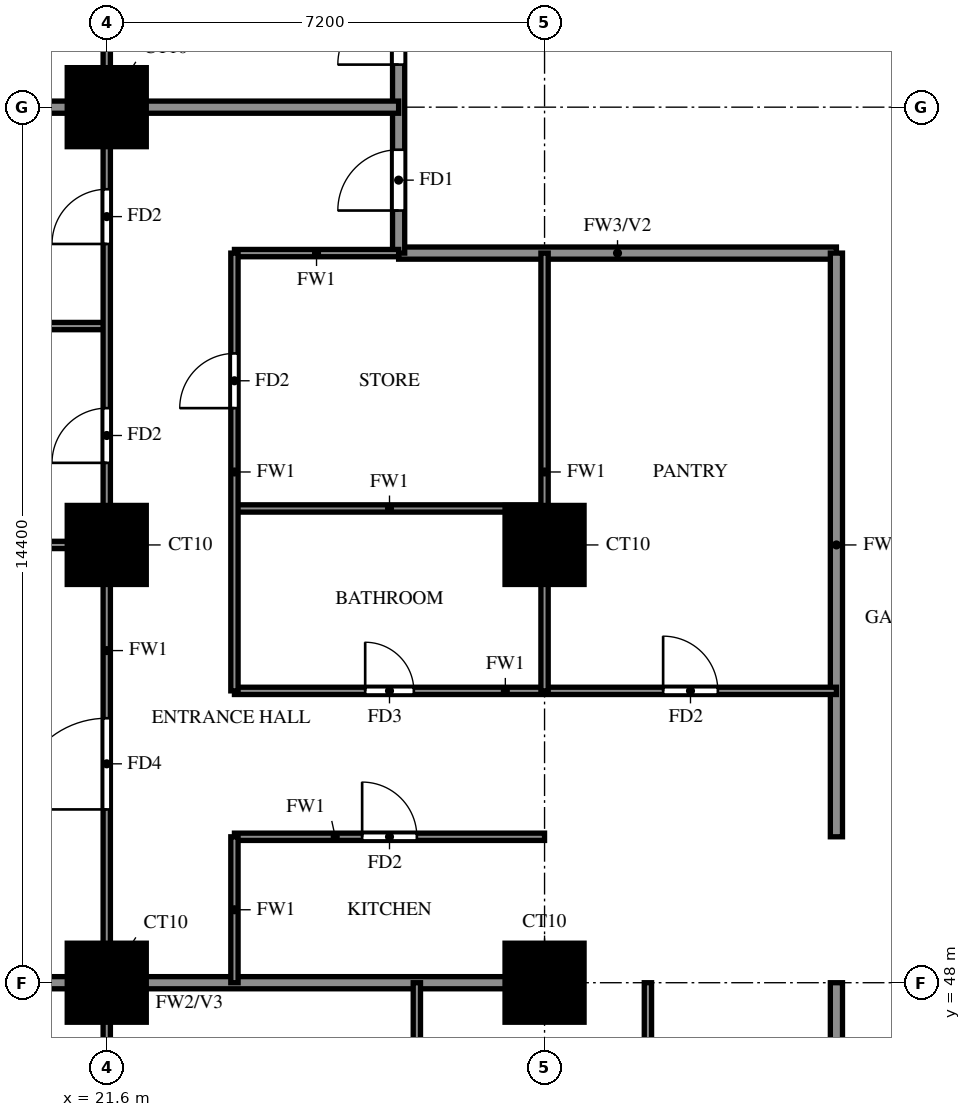
"""IFC4 building model, lengths in metres.
Left out: names, types, materials, properties, quantities, classifications, styles, units other than length and angle.
Written with IfcOpenShell. Run it as: python <this file> out.ifc"""

import sys

from ifc_helpers import new_model, si_unit, direction, frame, frame_2d, origin, origin_2d, place, context, subcontext, project, spatial, rectangle, extrude, source, transform, mapped, element, fill, save


model = new_model("IFC4")
c1 = context("Model", 3, precision=1e-05, world=origin(), true_north=direction((0.0, 1.0)))
c2 = subcontext(c1, "Body", "Model", "MODEL_VIEW")
j1 = project(units=[si_unit("LENGTHUNIT", "METRE"), si_unit("PLANEANGLEUNIT", "RADIAN")], contexts=[c1])
p1 = place(None, origin())
s1 = spatial("IfcSite", under=j1, at=p1, CompositionType="ELEMENT")
p2 = place(p1, origin())
s2 = spatial("IfcBuilding", under=s1, at=p2, CompositionType="ELEMENT")
p3 = place(p2, frame((0.0, 0.0, 76.0)))
s3 = spatial("IfcBuildingStorey", under=s2, at=p3, CompositionType="ELEMENT", Elevation=76.0)
m1 = source(origin(), c2, "Body", "SweptSolid", [
    extrude(rectangle(XDim=1.3, YDim=1.3, at=origin_2d()), origin(), (0.0, 0.0, 1.0), 3.18),
])
for number, where, z_axis, x_axis in (
    (1, (21.6, 48.0, 0.0), (0.0, 0.0, 1.0), (1.0, 0.0, 0.0)),
    (2, (28.8, 48.0, 0.0), (0.0, 0.0, 1.0), (1.0, 0.0, 0.0)),
    (3, (21.6, 55.2, 0.0), (0.0, 0.0, 1.0), (1.0, 0.0, 0.0)),
    (4, (28.8, 55.2, 0.0), (0.0, 0.0, 1.0), (1.0, 0.0, 0.0)),
    (5, (21.6, 62.4, 0.0), (0.0, 0.0, 1.0), (1.0, 0.0, 0.0)),
):
    element("IfcColumn", number, at=place(p3, frame(where, z_axis=z_axis, x_axis=x_axis)), inside=s3, PredefinedType="COLUMN", context=c2, shape_type="MappedRepresentation", body=[
        mapped(m1, transform((0.0, 0.0, 0.0))),
    ])
p4 = place(p3, frame((26.4, 60.0, 0.0), z_axis=(0.0, 0.0, 1.0), x_axis=(1.0, 0.0, 0.0)))
e6 = element("IfcWall", 6, at=p4, inside=s3, PredefinedType="SOLIDWALL", context=c2, shape_type="SweptSolid", body=[
    extrude(rectangle(XDim=7.2, YDim=0.2, at=frame_2d((3.6, 0.0))), origin(), (0.0, 0.0, 1.0), 3.18),
])
p5 = place(p3, frame((26.4, 60.0, 0.0), z_axis=(0.0, 0.0, 1.0), x_axis=(0.0, 1.0, 0.0)))
e7 = element("IfcWall", 7, at=p5, inside=s3, PredefinedType="SOLIDWALL", context=c2, shape_type="SweptSolid", body=[
    extrude(rectangle(XDim=9.45, YDim=0.2, at=frame_2d((4.725, 0.0))), origin(), (0.0, 0.0, 1.0), 3.18),
])
p6 = place(p5, frame((0.7, 0.0, 0.0)))
e8 = element("IfcOpeningElement", 8, at=p6, cuts=e7, PredefinedType="OPENING", context=c2, shape_type="SweptSolid", body=[
    extrude(rectangle(XDim=1.0, YDim=2.1, at=frame_2d((0.5, 1.05))), frame((0.0, 0.11, 0.0), z_axis=(0.0, -1.0, 0.0), x_axis=(1.0, 0.0, 0.0)), (0.0, 0.0, 1.0), 0.22),
])
p7 = place(p5, frame((3.1, 0.0, 0.0)))
e9 = element("IfcOpeningElement", 9, at=p7, cuts=e7, PredefinedType="OPENING", context=c2, shape_type="SweptSolid", body=[
    extrude(rectangle(XDim=1.0, YDim=2.1, at=frame_2d((0.5, 1.05))), frame((0.0, 0.11, 0.0), z_axis=(0.0, -1.0, 0.0), x_axis=(1.0, 0.0, 0.0)), (0.0, 0.0, 1.0), 0.22),
])
p8 = place(p3, frame((33.6, 45.6, 0.0), z_axis=(0.0, 0.0, 1.0), x_axis=(0.0, 1.0, 0.0)))
e10 = element("IfcWall", 10, at=p8, inside=s3, PredefinedType="SOLIDWALL", context=c2, shape_type="SweptSolid", body=[
    extrude(rectangle(XDim=2.4, YDim=0.2, at=frame_2d((1.2, 0.0))), origin(), (0.0, 0.0, 1.0), 3.18),
])
p9 = place(p3, frame((33.6, 50.4, 0.0), z_axis=(0.0, 0.0, 1.0), x_axis=(0.0, 1.0, 0.0)))
e11 = element("IfcWall", 11, at=p9, inside=s3, PredefinedType="SOLIDWALL", context=c2, shape_type="SweptSolid", body=[
    extrude(rectangle(XDim=9.6, YDim=0.2, at=frame_2d((4.8, 0.0))), origin(), (0.0, 0.0, 1.0), 3.18),
])
p10 = place(p3, frame((14.525, 48.0, 0.0), z_axis=(0.0, 0.0, 1.0), x_axis=(1.0, 0.0, 0.0)))
e12 = element("IfcWall", 12, at=p10, inside=s3, PredefinedType="SOLIDWALL", context=c2, shape_type="SweptSolid", body=[
    extrude(rectangle(XDim=14.275, YDim=0.2, at=frame_2d((7.138, 0.0))), origin(), (0.0, 0.0, 1.0), 3.18),
])
p11 = place(p3, frame((14.525, 62.4, 0.0), z_axis=(0.0, 0.0, 1.0), x_axis=(1.0, 0.0, 0.0)))
e13 = element("IfcWall", 13, at=p11, inside=s3, PredefinedType="SOLIDWALL", context=c2, shape_type="SweptSolid", body=[
    extrude(rectangle(XDim=11.875, YDim=0.2, at=frame_2d((5.938, 0.0))), origin(), (0.0, 0.0, 1.0), 3.18),
])
p12 = place(p3, frame((23.7, 50.4, 0.0), z_axis=(0.0, 0.0, 1.0), x_axis=(1.0, 0.0, 0.0)))
e14 = element("IfcWall", 14, at=p12, inside=s3, PredefinedType="PARTITIONING", context=c2, shape_type="SweptSolid", body=[
    extrude(rectangle(XDim=5.1, YDim=0.12, at=frame_2d((2.55, 0.0))), origin(), (0.0, 0.0, 1.0), 3.18),
])
p13 = place(p12, frame((2.1, 0.0, 0.0)))
e15 = element("IfcOpeningElement", 15, at=p13, cuts=e14, PredefinedType="OPENING", context=c2, shape_type="SweptSolid", body=[
    extrude(rectangle(XDim=0.9, YDim=2.1, at=frame_2d((0.45, 1.05))), frame((0.0, 0.07, 0.0), z_axis=(0.0, -1.0, 0.0), x_axis=(1.0, 0.0, 0.0)), (0.0, 0.0, 1.0), 0.14),
])
p14 = place(p3, frame((23.7, 52.8, 0.0), z_axis=(0.0, 0.0, 1.0), x_axis=(1.0, 0.0, 0.0)))
e16 = element("IfcWall", 16, at=p14, inside=s3, PredefinedType="PARTITIONING", context=c2, shape_type="SweptSolid", body=[
    extrude(rectangle(XDim=9.9, YDim=0.12, at=frame_2d((4.95, 0.0))), origin(), (0.0, 0.0, 1.0), 3.18),
])
p15 = place(p14, frame((2.15, 0.0, 0.0)))
e17 = element("IfcOpeningElement", 17, at=p15, cuts=e16, PredefinedType="OPENING", context=c2, shape_type="SweptSolid", body=[
    extrude(rectangle(XDim=0.8, YDim=2.1, at=frame_2d((0.4, 1.05))), frame((0.0, 0.07, 0.0), z_axis=(0.0, -1.0, 0.0), x_axis=(1.0, 0.0, 0.0)), (0.0, 0.0, 1.0), 0.14),
])
p16 = place(p14, frame((7.05, 0.0, 0.0)))
e18 = element("IfcOpeningElement", 18, at=p16, cuts=e16, PredefinedType="OPENING", context=c2, shape_type="SweptSolid", body=[
    extrude(rectangle(XDim=0.9, YDim=2.1, at=frame_2d((0.45, 1.05))), frame((0.0, 0.07, 0.0), z_axis=(0.0, -1.0, 0.0), x_axis=(1.0, 0.0, 0.0)), (0.0, 0.0, 1.0), 0.14),
])
p17 = place(p3, frame((14.525, 55.2, 0.0), z_axis=(0.0, 0.0, 1.0), x_axis=(1.0, 0.0, 0.0)))
e19 = element("IfcWall", 19, at=p17, inside=s3, PredefinedType="PARTITIONING", context=c2, shape_type="SweptSolid", body=[
    extrude(rectangle(XDim=7.075, YDim=0.12, at=frame_2d((3.538, 0.0))), origin(), (0.0, 0.0, 1.0), 3.18),
])
p18 = place(p3, frame((23.7, 55.8, 0.0), z_axis=(0.0, 0.0, 1.0), x_axis=(1.0, 0.0, 0.0)))
e20 = element("IfcWall", 20, at=p18, inside=s3, PredefinedType="PARTITIONING", context=c2, shape_type="SweptSolid", body=[
    extrude(rectangle(XDim=5.1, YDim=0.12, at=frame_2d((2.55, 0.0))), origin(), (0.0, 0.0, 1.0), 3.18),
])
p19 = place(p3, frame((14.525, 58.8, 0.0), z_axis=(0.0, 0.0, 1.0), x_axis=(1.0, 0.0, 0.0)))
e21 = element("IfcWall", 21, at=p19, inside=s3, PredefinedType="PARTITIONING", context=c2, shape_type="SweptSolid", body=[
    extrude(rectangle(XDim=7.075, YDim=0.12, at=frame_2d((3.538, 0.0))), origin(), (0.0, 0.0, 1.0), 2.28),
])
p20 = place(p3, frame((23.7, 60.0, 0.0), z_axis=(0.0, 0.0, 1.0), x_axis=(1.0, 0.0, 0.0)))
e22 = element("IfcWall", 22, at=p20, inside=s3, PredefinedType="PARTITIONING", context=c2, shape_type="SweptSolid", body=[
    extrude(rectangle(XDim=2.7, YDim=0.12, at=frame_2d((1.35, 0.0))), origin(), (0.0, 0.0, 1.0), 3.18),
])
p21 = place(p3, frame((21.6, 33.725, 0.0), z_axis=(0.0, 0.0, 1.0), x_axis=(0.0, 1.0, 0.0)))
e23 = element("IfcWall", 23, at=p21, inside=s3, PredefinedType="PARTITIONING", context=c2, shape_type="SweptSolid", body=[
    extrude(rectangle(XDim=39.475, YDim=0.12, at=frame_2d((19.737, 0.0))), origin(), (0.0, 0.0, 1.0), 3.18),
])
p22 = place(p21, frame((7.775, 0.0, 0.0)))
e24 = element("IfcOpeningElement", 24, at=p22, cuts=e23, PredefinedType="OPENING", context=c2, shape_type="SweptSolid", body=[
    extrude(rectangle(XDim=0.9, YDim=2.1, at=frame_2d((0.45, 1.05))), frame((0.0, 0.07, 0.0), z_axis=(0.0, -1.0, 0.0), x_axis=(1.0, 0.0, 0.0)), (0.0, 0.0, 1.0), 0.14),
])
p23 = place(p21, frame((17.125, 0.0, 0.0)))
e25 = element("IfcOpeningElement", 25, at=p23, cuts=e23, PredefinedType="OPENING", context=c2, shape_type="SweptSolid", body=[
    extrude(rectangle(XDim=1.5, YDim=2.1, at=frame_2d((0.75, 1.05))), frame((0.0, 0.07, 0.0), z_axis=(0.0, -1.0, 0.0), x_axis=(1.0, 0.0, 0.0)), (0.0, 0.0, 1.0), 0.14),
])
p24 = place(p21, frame((22.825, 0.0, 0.0)))
e26 = element("IfcOpeningElement", 26, at=p24, cuts=e23, PredefinedType="OPENING", context=c2, shape_type="SweptSolid", body=[
    extrude(rectangle(XDim=0.9, YDim=2.1, at=frame_2d((0.45, 1.05))), frame((0.0, 0.07, 0.0), z_axis=(0.0, -1.0, 0.0), x_axis=(1.0, 0.0, 0.0)), (0.0, 0.0, 1.0), 0.14),
])
p25 = place(p21, frame((26.425, 0.0, 0.0)))
e27 = element("IfcOpeningElement", 27, at=p25, cuts=e23, PredefinedType="OPENING", context=c2, shape_type="SweptSolid", body=[
    extrude(rectangle(XDim=0.9, YDim=2.1, at=frame_2d((0.45, 1.05))), frame((0.0, 0.07, 0.0), z_axis=(0.0, -1.0, 0.0), x_axis=(1.0, 0.0, 0.0)), (0.0, 0.0, 1.0), 0.14),
])
p26 = place(p21, frame((30.025, 0.0, 0.0)))
e28 = element("IfcOpeningElement", 28, at=p26, cuts=e23, PredefinedType="OPENING", context=c2, shape_type="SweptSolid", body=[
    extrude(rectangle(XDim=0.9, YDim=2.1, at=frame_2d((0.45, 1.05))), frame((0.0, 0.07, 0.0), z_axis=(0.0, -1.0, 0.0), x_axis=(1.0, 0.0, 0.0)), (0.0, 0.0, 1.0), 0.14),
])
p27 = place(p21, frame((33.625, 0.0, 0.0)))
e29 = element("IfcOpeningElement", 29, at=p27, cuts=e23, PredefinedType="OPENING", context=c2, shape_type="SweptSolid", body=[
    extrude(rectangle(XDim=0.9, YDim=2.1, at=frame_2d((0.45, 1.05))), frame((0.0, 0.07, 0.0), z_axis=(0.0, -1.0, 0.0), x_axis=(1.0, 0.0, 0.0)), (0.0, 0.0, 1.0), 0.14),
])
p28 = place(p21, frame((37.225, 0.0, 0.0)))
e30 = element("IfcOpeningElement", 30, at=p28, cuts=e23, PredefinedType="OPENING", context=c2, shape_type="SweptSolid", body=[
    extrude(rectangle(XDim=0.9, YDim=2.1, at=frame_2d((0.45, 1.05))), frame((0.0, 0.07, 0.0), z_axis=(0.0, -1.0, 0.0), x_axis=(1.0, 0.0, 0.0)), (0.0, 0.0, 1.0), 0.14),
])
p29 = place(p3, frame((23.7, 48.0, 0.0), z_axis=(0.0, 0.0, 1.0), x_axis=(0.0, 1.0, 0.0)))
e31 = element("IfcWall", 31, at=p29, inside=s3, PredefinedType="PARTITIONING", context=c2, shape_type="SweptSolid", body=[
    extrude(rectangle(XDim=2.4, YDim=0.12, at=frame_2d((1.2, 0.0))), origin(), (0.0, 0.0, 1.0), 3.18),
])
p30 = place(p3, frame((23.7, 52.8, 0.0), z_axis=(0.0, 0.0, 1.0), x_axis=(0.0, 1.0, 0.0)))
e32 = element("IfcWall", 32, at=p30, inside=s3, PredefinedType="PARTITIONING", context=c2, shape_type="SweptSolid", body=[
    extrude(rectangle(XDim=7.2, YDim=0.12, at=frame_2d((3.6, 0.0))), origin(), (0.0, 0.0, 1.0), 3.18),
])
p31 = place(p30, frame((4.65, 0.0, 0.0)))
e33 = element("IfcOpeningElement", 33, at=p31, cuts=e32, PredefinedType="OPENING", context=c2, shape_type="SweptSolid", body=[
    extrude(rectangle(XDim=0.9, YDim=2.1, at=frame_2d((0.45, 1.05))), frame((0.0, 0.07, 0.0), z_axis=(0.0, -1.0, 0.0), x_axis=(1.0, 0.0, 0.0)), (0.0, 0.0, 1.0), 0.14),
])
p32 = place(p3, frame((26.7, 42.9, 0.0), z_axis=(0.0, 0.0, 1.0), x_axis=(0.0, 1.0, 0.0)))
e34 = element("IfcWall", 34, at=p32, inside=s3, PredefinedType="PARTITIONING", context=c2, shape_type="SweptSolid", body=[
    extrude(rectangle(XDim=5.1, YDim=0.12, at=frame_2d((2.55, 0.0))), origin(), (0.0, 0.0, 1.0), 3.18),
])
p33 = place(p3, frame((28.8, 52.8, 0.0), z_axis=(0.0, 0.0, 1.0), x_axis=(0.0, 1.0, 0.0)))
e35 = element("IfcWall", 35, at=p33, inside=s3, PredefinedType="PARTITIONING", context=c2, shape_type="SweptSolid", body=[
    extrude(rectangle(XDim=7.2, YDim=0.12, at=frame_2d((3.6, 0.0))), origin(), (0.0, 0.0, 1.0), 3.18),
])
p34 = place(p3, frame((30.5, 42.9, 0.0), z_axis=(0.0, 0.0, 1.0), x_axis=(0.0, 1.0, 0.0)))
e36 = element("IfcWall", 36, at=p34, inside=s3, PredefinedType="PARTITIONING", context=c2, shape_type="SweptSolid", body=[
    extrude(rectangle(XDim=5.1, YDim=0.12, at=frame_2d((2.55, 0.0))), origin(), (0.0, 0.0, 1.0), 3.18),
])
p35 = place(p6, origin())
e37 = element("IfcDoor", 37, at=p35, inside=s3, OperationType="SINGLE_SWING_LEFT", PredefinedType="DOOR", context=c2, shape_type="SweptSolid", body=[
    extrude(rectangle(XDim=1.0, YDim=2.1, at=frame_2d((0.5, 1.05))), frame((0.0, 0.025, 0.0), z_axis=(0.0, -1.0, 0.0), x_axis=(1.0, 0.0, 0.0)), (0.0, 0.0, 1.0), 0.05),
])
fill(e8, e37)
p36 = place(p23, origin())
e38 = element("IfcDoor", 38, at=p36, inside=s3, OperationType="SINGLE_SWING_LEFT", PredefinedType="DOOR", context=c2, shape_type="SweptSolid", body=[
    extrude(rectangle(XDim=1.5, YDim=2.1, at=frame_2d((0.75, 1.05))), frame((0.0, 0.025, 0.0), z_axis=(0.0, -1.0, 0.0), x_axis=(1.0, 0.0, 0.0)), (0.0, 0.0, 1.0), 0.05),
])
fill(e25, e38)
p37 = place(p24, origin())
e39 = element("IfcDoor", 39, at=p37, inside=s3, OperationType="SINGLE_SWING_RIGHT", PredefinedType="DOOR", context=c2, shape_type="SweptSolid", body=[
    extrude(rectangle(XDim=0.9, YDim=2.1, at=frame_2d((0.45, 1.05))), frame((0.0, 0.025, 0.0), z_axis=(0.0, -1.0, 0.0), x_axis=(1.0, 0.0, 0.0)), (0.0, 0.0, 1.0), 0.05),
])
fill(e26, e39)
p38 = place(p25, origin())
e40 = element("IfcDoor", 40, at=p38, inside=s3, OperationType="SINGLE_SWING_LEFT", PredefinedType="DOOR", context=c2, shape_type="SweptSolid", body=[
    extrude(rectangle(XDim=0.9, YDim=2.1, at=frame_2d((0.45, 1.05))), frame((0.0, 0.025, 0.0), z_axis=(0.0, -1.0, 0.0), x_axis=(1.0, 0.0, 0.0)), (0.0, 0.0, 1.0), 0.05),
])
fill(e27, e40)
p39 = place(p13, origin())
e41 = element("IfcDoor", 41, at=p39, inside=s3, OperationType="SINGLE_SWING_LEFT", PredefinedType="DOOR", context=c2, shape_type="SweptSolid", body=[
    extrude(rectangle(XDim=0.9, YDim=2.1, at=frame_2d((0.45, 1.05))), frame((0.0, 0.025, 0.0), z_axis=(0.0, -1.0, 0.0), x_axis=(1.0, 0.0, 0.0)), (0.0, 0.0, 1.0), 0.05),
])
fill(e15, e41)
p40 = place(p15, origin())
e42 = element("IfcDoor", 42, at=p40, inside=s3, OperationType="SINGLE_SWING_RIGHT", PredefinedType="DOOR", context=c2, shape_type="SweptSolid", body=[
    extrude(rectangle(XDim=0.8, YDim=2.1, at=frame_2d((0.4, 1.05))), frame((0.0, 0.025, 0.0), z_axis=(0.0, -1.0, 0.0), x_axis=(1.0, 0.0, 0.0)), (0.0, 0.0, 1.0), 0.05),
])
fill(e17, e42)
p41 = place(p31, origin())
e43 = element("IfcDoor", 43, at=p41, inside=s3, OperationType="SINGLE_SWING_LEFT", PredefinedType="DOOR", context=c2, shape_type="SweptSolid", body=[
    extrude(rectangle(XDim=0.9, YDim=2.1, at=frame_2d((0.45, 1.05))), frame((0.0, 0.025, 0.0), z_axis=(0.0, -1.0, 0.0), x_axis=(1.0, 0.0, 0.0)), (0.0, 0.0, 1.0), 0.05),
])
fill(e33, e43)
p42 = place(p16, origin())
e44 = element("IfcDoor", 44, at=p42, inside=s3, OperationType="SINGLE_SWING_LEFT", PredefinedType="DOOR", context=c2, shape_type="SweptSolid", body=[
    extrude(rectangle(XDim=0.9, YDim=2.1, at=frame_2d((0.45, 1.05))), frame((0.0, 0.025, 0.0), z_axis=(0.0, -1.0, 0.0), x_axis=(1.0, 0.0, 0.0)), (0.0, 0.0, 1.0), 0.05),
])
fill(e18, e44)
p43 = place(p7, origin())
e45 = element("IfcDoor", 45, at=p43, inside=s3, OperationType="SINGLE_SWING_LEFT", PredefinedType="DOOR", context=c2, shape_type="SweptSolid", body=[
    extrude(rectangle(XDim=1.0, YDim=2.1, at=frame_2d((0.5, 1.05))), frame((0.0, 0.025, 0.0), z_axis=(0.0, -1.0, 0.0), x_axis=(1.0, 0.0, 0.0)), (0.0, 0.0, 1.0), 0.05),
])
fill(e9, e45)
save(model, sys.argv[1])
